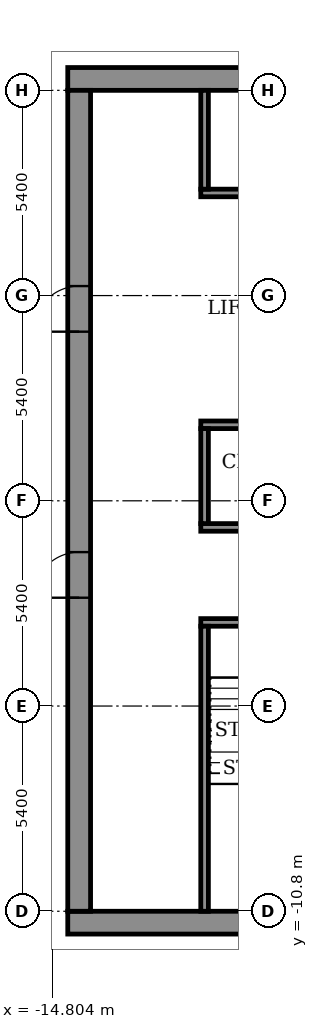
"""IFC4 building model, lengths in metres.
Left out: names, types, materials, properties, quantities, classifications, styles, units other than length and angle.
Written with IfcOpenShell. Run it as: python <this file> out.ifc"""

import sys

from ifc_helpers import new_model, si_unit, direction, frame, frame_2d, origin, place, context, subcontext, project, spatial, rectangle, extrude, element, fill, save


model = new_model("IFC4")
c1 = context("Model", 3, precision=1e-05, world=origin(), true_north=direction((0.0, 1.0)))
c2 = subcontext(c1, "Body", "Model", "MODEL_VIEW")
j1 = project(units=[si_unit("LENGTHUNIT", "METRE"), si_unit("PLANEANGLEUNIT", "RADIAN")], contexts=[c1])
p1 = place(None, origin())
s1 = spatial("IfcSite", under=j1, at=p1, CompositionType="ELEMENT")
p2 = place(p1, origin())
s2 = spatial("IfcBuilding", under=s1, at=p2, CompositionType="ELEMENT")
p3 = place(p2, frame((0.0, 0.0, 313.3)))
s3 = spatial("IfcBuildingStorey", under=s2, at=p3, CompositionType="ELEMENT", Elevation=313.3)
for number, where, z_axis, x_axis in (
    (1, (-14.4, -11.1, 0.0), (0.0, 0.0, 1.0), (1.0, 0.0, 0.0)),
    (2, (-14.4, 11.1, 0.0), (0.0, 0.0, 1.0), (1.0, 0.0, 0.0)),
):
    element("IfcWall", number, at=place(p3, frame(where, z_axis=z_axis, x_axis=x_axis)), inside=s3, PredefinedType="SHEAR", context=c2, shape_type="SweptSolid", body=[
        extrude(rectangle(XDim=28.8, YDim=0.6, at=frame_2d((14.4, 0.0))), origin(), (0.0, 0.0, 1.0), 3.6),
    ])
p4 = place(p3, frame((-14.1, -10.8, 0.0), z_axis=(0.0, 0.0, 1.0), x_axis=(0.0, 1.0, 0.0)))
e3 = element("IfcWall", 3, at=p4, inside=s3, PredefinedType="SHEAR", context=c2, shape_type="SweptSolid", body=[
    extrude(rectangle(XDim=21.6, YDim=0.6, at=frame_2d((10.8, 0.0))), origin(), (0.0, 0.0, 1.0), 3.6),
])
p5 = place(p4, frame((8.25, 0.0, 0.0)))
e4 = element("IfcOpeningElement", 4, at=p5, cuts=e3, PredefinedType="OPENING", context=c2, shape_type="SweptSolid", body=[
    extrude(rectangle(XDim=1.2, YDim=2.1, at=frame_2d((0.6, 1.05))), frame((0.0, 0.31, 0.0), z_axis=(0.0, -1.0, 0.0), x_axis=(1.0, 0.0, 0.0)), (0.0, 0.0, 1.0), 0.62),
])
p6 = place(p4, frame((15.25, 0.0, 0.0)))
e5 = element("IfcOpeningElement", 5, at=p6, cuts=e3, PredefinedType="OPENING", context=c2, shape_type="SweptSolid", body=[
    extrude(rectangle(XDim=1.2, YDim=2.1, at=frame_2d((0.6, 1.05))), frame((0.0, 0.31, 0.0), z_axis=(0.0, -1.0, 0.0), x_axis=(1.0, 0.0, 0.0)), (0.0, 0.0, 1.0), 0.62),
])
p7 = place(p3, frame((-10.9, -3.2, 0.0), z_axis=(0.0, 0.0, 1.0), x_axis=(1.0, 0.0, 0.0)))
e6 = element("IfcWall", 6, at=p7, inside=s3, PredefinedType="SHEAR", context=c2, shape_type="SweptSolid", body=[
    extrude(rectangle(XDim=21.8, YDim=0.2, at=frame_2d((10.9, 0.0))), origin(), (0.0, 0.0, 1.0), 3.05),
])
p8 = place(p7, frame((1.075, 0.0, 0.0)))
e7 = element("IfcOpeningElement", 7, at=p8, cuts=e6, PredefinedType="OPENING", context=c2, shape_type="SweptSolid", body=[
    extrude(rectangle(XDim=1.1, YDim=2.1, at=frame_2d((0.55, 1.05))), frame((0.0, 0.11, 0.0), z_axis=(0.0, -1.0, 0.0), x_axis=(1.0, 0.0, 0.0)), (0.0, 0.0, 1.0), 0.22),
])
p9 = place(p7, frame((10.325, 0.0, 0.0)))
e8 = element("IfcOpeningElement", 8, at=p9, cuts=e6, PredefinedType="OPENING", context=c2, shape_type="SweptSolid", body=[
    extrude(rectangle(XDim=1.1, YDim=2.1, at=frame_2d((0.55, 1.05))), frame((0.0, 0.11, 0.0), z_axis=(0.0, -1.0, 0.0), x_axis=(1.0, 0.0, 0.0)), (0.0, 0.0, 1.0), 0.22),
])
p10 = place(p7, frame((19.625, 0.0, 0.0)))
e9 = element("IfcOpeningElement", 9, at=p10, cuts=e6, PredefinedType="OPENING", context=c2, shape_type="SweptSolid", body=[
    extrude(rectangle(XDim=1.1, YDim=2.1, at=frame_2d((0.55, 1.05))), frame((0.0, 0.11, 0.0), z_axis=(0.0, -1.0, 0.0), x_axis=(1.0, 0.0, 0.0)), (0.0, 0.0, 1.0), 0.22),
])
p11 = place(p7, frame((5.7, 0.0, 0.0)))
e10 = element("IfcOpeningElement", 10, at=p11, cuts=e6, PredefinedType="OPENING", context=c2, shape_type="SweptSolid", body=[
    extrude(rectangle(XDim=1.1, YDim=2.1, at=frame_2d((0.55, 1.05))), frame((0.0, 0.11, 0.0), z_axis=(0.0, -1.0, 0.0), x_axis=(1.0, 0.0, 0.0)), (0.0, 0.0, 1.0), 0.22),
])
p12 = place(p7, frame((14.975, 0.0, 0.0)))
e11 = element("IfcOpeningElement", 11, at=p12, cuts=e6, PredefinedType="OPENING", context=c2, shape_type="SweptSolid", body=[
    extrude(rectangle(XDim=1.1, YDim=2.1, at=frame_2d((0.55, 1.05))), frame((0.0, 0.11, 0.0), z_axis=(0.0, -1.0, 0.0), x_axis=(1.0, 0.0, 0.0)), (0.0, 0.0, 1.0), 0.22),
])
p13 = place(p3, frame((-10.9, -0.7, 0.0), z_axis=(0.0, 0.0, 1.0), x_axis=(1.0, 0.0, 0.0)))
e12 = element("IfcWall", 12, at=p13, inside=s3, PredefinedType="SHEAR", context=c2, shape_type="SweptSolid", body=[
    extrude(rectangle(XDim=21.8, YDim=0.2, at=frame_2d((10.9, 0.0))), origin(), (0.0, 0.0, 1.0), 3.05),
])
p14 = place(p3, frame((-10.9, 2.0, 0.0), z_axis=(0.0, 0.0, 1.0), x_axis=(1.0, 0.0, 0.0)))
e13 = element("IfcWall", 13, at=p14, inside=s3, PredefinedType="SHEAR", context=c2, shape_type="SweptSolid", body=[
    extrude(rectangle(XDim=21.8, YDim=0.2, at=frame_2d((10.9, 0.0))), origin(), (0.0, 0.0, 1.0), 3.05),
])
p15 = place(p14, frame((4.95, 0.0, 0.0)))
e14 = element("IfcOpeningElement", 14, at=p15, cuts=e13, PredefinedType="OPENING", context=c2, shape_type="SweptSolid", body=[
    extrude(rectangle(XDim=1.1, YDim=2.1, at=frame_2d((0.55, 1.05))), frame((0.0, 0.11, 0.0), z_axis=(0.0, -1.0, 0.0), x_axis=(1.0, 0.0, 0.0)), (0.0, 0.0, 1.0), 0.22),
])
p16 = place(p14, frame((7.65, 0.0, 0.0)))
e15 = element("IfcOpeningElement", 15, at=p16, cuts=e13, PredefinedType="OPENING", context=c2, shape_type="SweptSolid", body=[
    extrude(rectangle(XDim=1.1, YDim=2.1, at=frame_2d((0.55, 1.05))), frame((0.0, 0.11, 0.0), z_axis=(0.0, -1.0, 0.0), x_axis=(1.0, 0.0, 0.0)), (0.0, 0.0, 1.0), 0.22),
])
p17 = place(p14, frame((10.35, 0.0, 0.0)))
e16 = element("IfcOpeningElement", 16, at=p17, cuts=e13, PredefinedType="OPENING", context=c2, shape_type="SweptSolid", body=[
    extrude(rectangle(XDim=1.1, YDim=2.1, at=frame_2d((0.55, 1.05))), frame((0.0, 0.11, 0.0), z_axis=(0.0, -1.0, 0.0), x_axis=(1.0, 0.0, 0.0)), (0.0, 0.0, 1.0), 0.22),
])
p18 = place(p14, frame((1.675, 0.0, 0.0)))
e17 = element("IfcOpeningElement", 17, at=p18, cuts=e13, PredefinedType="OPENING", context=c2, shape_type="SweptSolid", body=[
    extrude(rectangle(XDim=0.9, YDim=2.1, at=frame_2d((0.45, 1.05))), frame((0.0, 0.11, 0.0), z_axis=(0.0, -1.0, 0.0), x_axis=(1.0, 0.0, 0.0)), (0.0, 0.0, 1.0), 0.22),
])
p19 = place(p14, frame((14.5, 0.0, 0.0)))
e18 = element("IfcOpeningElement", 18, at=p19, cuts=e13, PredefinedType="OPENING", context=c2, shape_type="SweptSolid", body=[
    extrude(rectangle(XDim=0.9, YDim=2.1, at=frame_2d((0.45, 1.05))), frame((0.0, 0.11, 0.0), z_axis=(0.0, -1.0, 0.0), x_axis=(1.0, 0.0, 0.0)), (0.0, 0.0, 1.0), 0.22),
])
p20 = place(p14, frame((19.225, 0.0, 0.0)))
e19 = element("IfcOpeningElement", 19, at=p20, cuts=e13, PredefinedType="OPENING", context=c2, shape_type="SweptSolid", body=[
    extrude(rectangle(XDim=0.9, YDim=2.1, at=frame_2d((0.45, 1.05))), frame((0.0, 0.11, 0.0), z_axis=(0.0, -1.0, 0.0), x_axis=(1.0, 0.0, 0.0)), (0.0, 0.0, 1.0), 0.22),
])
p21 = place(p3, frame((-10.9, 8.1, 0.0), z_axis=(0.0, 0.0, 1.0), x_axis=(1.0, 0.0, 0.0)))
e20 = element("IfcWall", 20, at=p21, inside=s3, PredefinedType="SHEAR", context=c2, shape_type="SweptSolid", body=[
    extrude(rectangle(XDim=21.8, YDim=0.2, at=frame_2d((10.9, 0.0))), origin(), (0.0, 0.0, 1.0), 3.05),
])
p22 = place(p21, frame((4.95, 0.0, 0.0)))
e21 = element("IfcOpeningElement", 21, at=p22, cuts=e20, PredefinedType="OPENING", context=c2, shape_type="SweptSolid", body=[
    extrude(rectangle(XDim=1.1, YDim=2.1, at=frame_2d((0.55, 1.05))), frame((0.0, 0.11, 0.0), z_axis=(0.0, -1.0, 0.0), x_axis=(1.0, 0.0, 0.0)), (0.0, 0.0, 1.0), 0.22),
])
p23 = place(p21, frame((7.65, 0.0, 0.0)))
e22 = element("IfcOpeningElement", 22, at=p23, cuts=e20, PredefinedType="OPENING", context=c2, shape_type="SweptSolid", body=[
    extrude(rectangle(XDim=1.1, YDim=2.1, at=frame_2d((0.55, 1.05))), frame((0.0, 0.11, 0.0), z_axis=(0.0, -1.0, 0.0), x_axis=(1.0, 0.0, 0.0)), (0.0, 0.0, 1.0), 0.22),
])
p24 = place(p21, frame((10.35, 0.0, 0.0)))
e23 = element("IfcOpeningElement", 23, at=p24, cuts=e20, PredefinedType="OPENING", context=c2, shape_type="SweptSolid", body=[
    extrude(rectangle(XDim=1.1, YDim=2.1, at=frame_2d((0.55, 1.05))), frame((0.0, 0.11, 0.0), z_axis=(0.0, -1.0, 0.0), x_axis=(1.0, 0.0, 0.0)), (0.0, 0.0, 1.0), 0.22),
])
p25 = place(p21, frame((1.675, 0.0, 0.0)))
e24 = element("IfcOpeningElement", 24, at=p25, cuts=e20, PredefinedType="OPENING", context=c2, shape_type="SweptSolid", body=[
    extrude(rectangle(XDim=0.9, YDim=2.1, at=frame_2d((0.45, 1.05))), frame((0.0, 0.11, 0.0), z_axis=(0.0, -1.0, 0.0), x_axis=(1.0, 0.0, 0.0)), (0.0, 0.0, 1.0), 0.22),
])
p26 = place(p21, frame((14.5, 0.0, 0.0)))
e25 = element("IfcOpeningElement", 25, at=p26, cuts=e20, PredefinedType="OPENING", context=c2, shape_type="SweptSolid", body=[
    extrude(rectangle(XDim=0.9, YDim=2.1, at=frame_2d((0.45, 1.05))), frame((0.0, 0.11, 0.0), z_axis=(0.0, -1.0, 0.0), x_axis=(1.0, 0.0, 0.0)), (0.0, 0.0, 1.0), 0.22),
])
p27 = place(p21, frame((19.225, 0.0, 0.0)))
e26 = element("IfcOpeningElement", 26, at=p27, cuts=e20, PredefinedType="OPENING", context=c2, shape_type="SweptSolid", body=[
    extrude(rectangle(XDim=0.9, YDim=2.1, at=frame_2d((0.45, 1.05))), frame((0.0, 0.11, 0.0), z_axis=(0.0, -1.0, 0.0), x_axis=(1.0, 0.0, 0.0)), (0.0, 0.0, 1.0), 0.22),
])
p28 = place(p3, frame((-10.8, -10.8, 0.0), z_axis=(0.0, 0.0, 1.0), x_axis=(0.0, 1.0, 0.0)))
e27 = element("IfcWall", 27, at=p28, inside=s3, PredefinedType="SHEAR", context=c2, shape_type="SweptSolid", body=[
    extrude(rectangle(XDim=7.5, YDim=0.2, at=frame_2d((3.75, 0.0))), origin(), (0.0, 0.0, 1.0), 3.05),
])
p29 = place(p3, frame((-10.8, -0.6, 0.0), z_axis=(0.0, 0.0, 1.0), x_axis=(0.0, 1.0, 0.0)))
e28 = element("IfcWall", 28, at=p29, inside=s3, PredefinedType="STANDARD", context=c2, shape_type="SweptSolid", body=[
    extrude(rectangle(XDim=2.5, YDim=0.2, at=frame_2d((1.25, 0.0))), origin(), (0.0, 0.0, 1.0), 3.05),
])
p30 = place(p3, frame((-10.8, 8.2, 0.0), z_axis=(0.0, 0.0, 1.0), x_axis=(0.0, 1.0, 0.0)))
e29 = element("IfcWall", 29, at=p30, inside=s3, PredefinedType="STANDARD", context=c2, shape_type="SweptSolid", body=[
    extrude(rectangle(XDim=2.6, YDim=0.2, at=frame_2d((1.3, 0.0))), origin(), (0.0, 0.0, 1.0), 3.05),
])
p31 = place(p5, origin())
e30 = element("IfcDoor", 30, at=p31, inside=s3, OperationType="DOUBLE_DOOR_SINGLE_SWING", PredefinedType="DOOR", context=c2, shape_type="SweptSolid", body=[
    extrude(rectangle(XDim=1.2, YDim=2.1, at=frame_2d((0.6, 1.05))), frame((0.0, 0.025, 0.0), z_axis=(0.0, -1.0, 0.0), x_axis=(1.0, 0.0, 0.0)), (0.0, 0.0, 1.0), 0.05),
])
fill(e4, e30)
p32 = place(p6, origin())
e31 = element("IfcDoor", 31, at=p32, inside=s3, OperationType="DOUBLE_DOOR_SINGLE_SWING", PredefinedType="DOOR", context=c2, shape_type="SweptSolid", body=[
    extrude(rectangle(XDim=1.2, YDim=2.1, at=frame_2d((0.6, 1.05))), frame((0.0, 0.025, 0.0), z_axis=(0.0, -1.0, 0.0), x_axis=(1.0, 0.0, 0.0)), (0.0, 0.0, 1.0), 0.05),
])
fill(e5, e31)
save(model, sys.argv[1])
